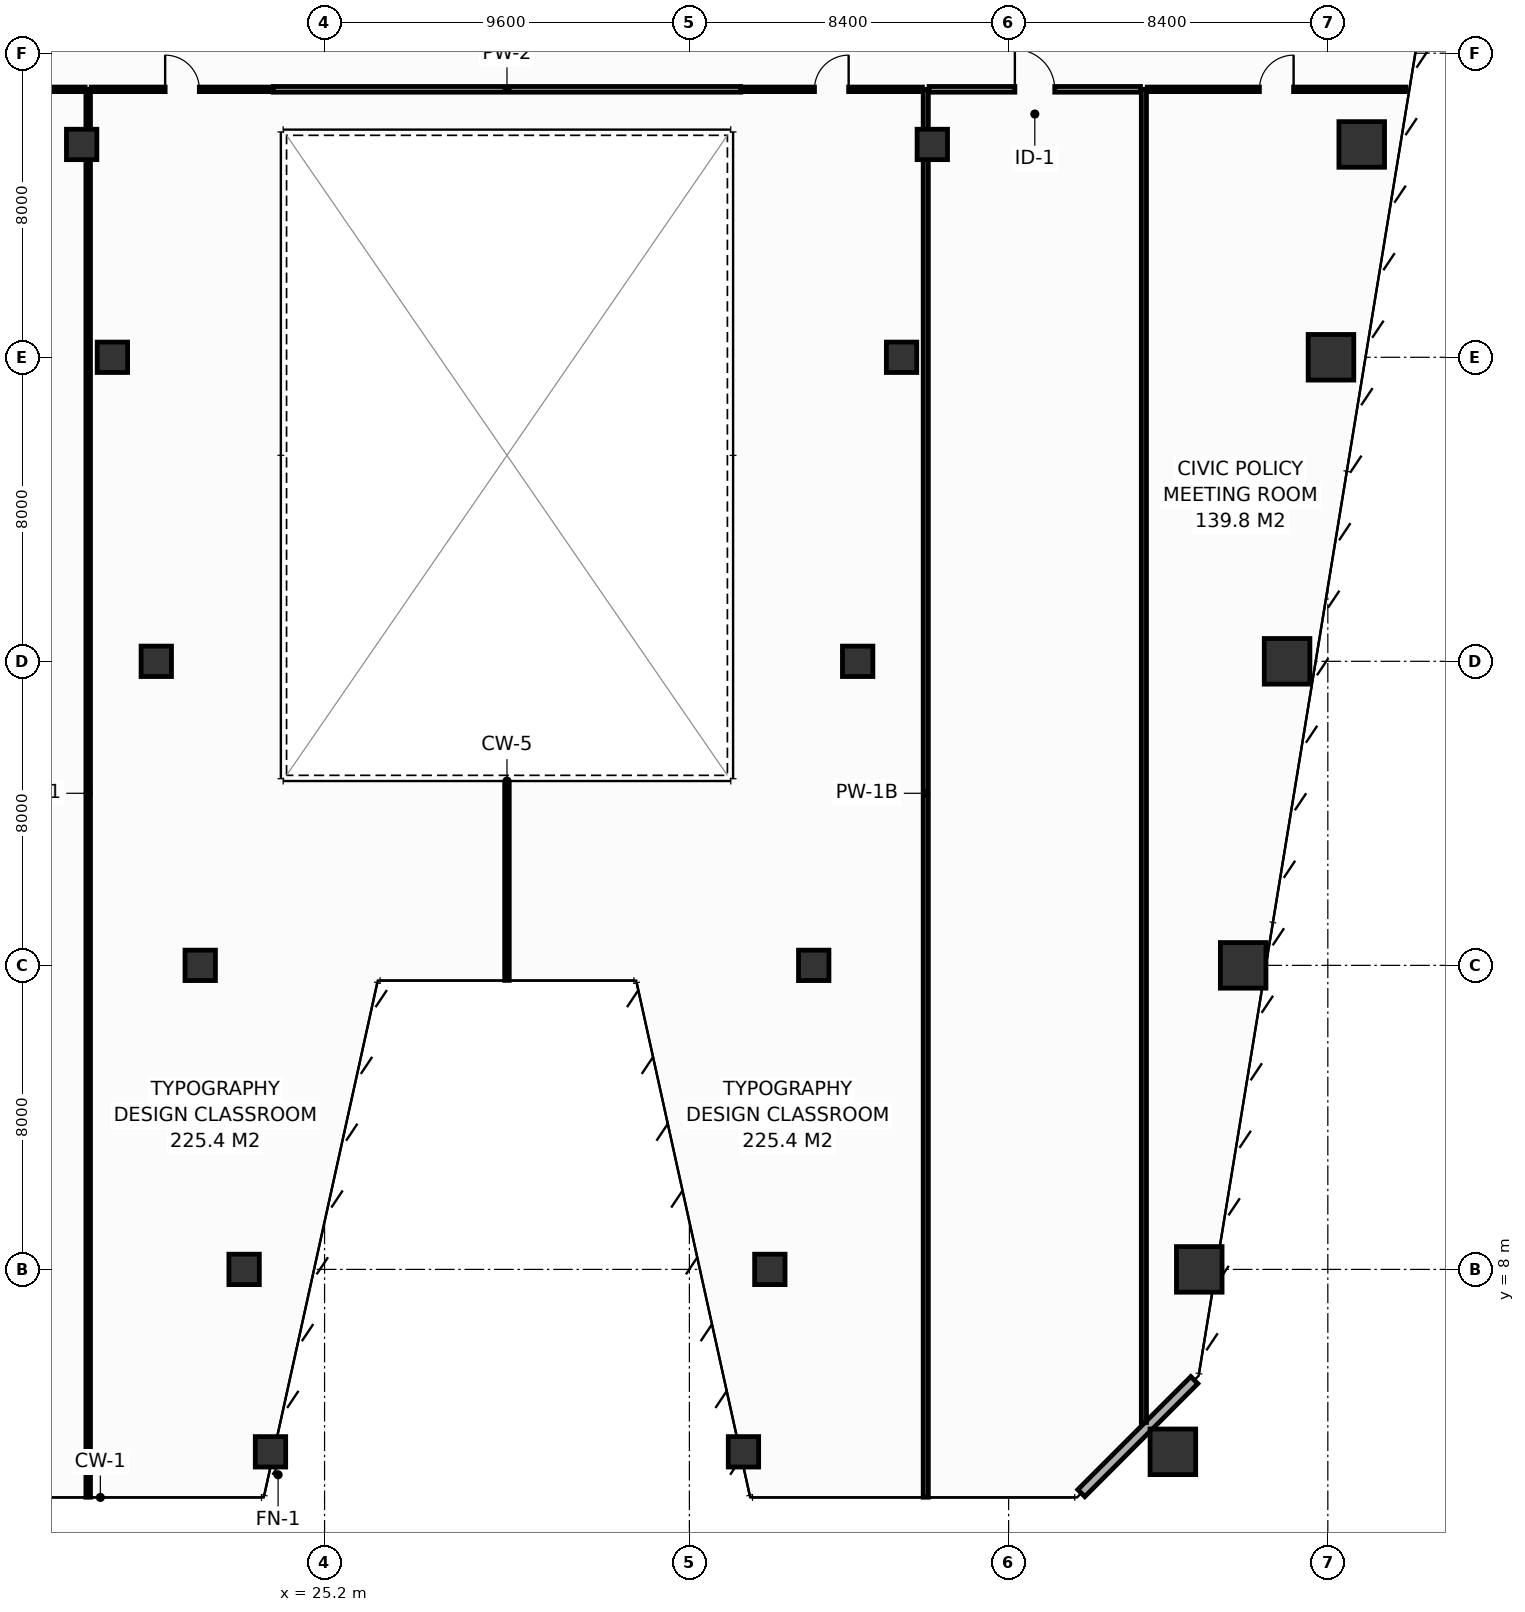
"""IFC4 building model, lengths in metres.
Left out: names, types, materials, properties, quantities, classifications, styles, units other than length and angle.
Written with IfcOpenShell. Run it as: python <this file> out.ifc"""

import sys

from ifc_helpers import new_model, si_unit, direction, frame, frame_2d, origin, origin_2d, place, context, subcontext, project, spatial, rectangle, hollow_rectangle, extrude, element, fill, save


model = new_model("IFC4")
c1 = context("Model", 3, precision=1e-05, world=origin(), true_north=direction((0.0, 1.0)))
c2 = subcontext(c1, "Body", "Model", "MODEL_VIEW")
j1 = project(units=[si_unit("LENGTHUNIT", "METRE"), si_unit("PLANEANGLEUNIT", "RADIAN")], contexts=[c1])
p1 = place(None, origin())
s1 = spatial("IfcSite", under=j1, at=p1, CompositionType="ELEMENT")
p2 = place(p1, origin())
s2 = spatial("IfcBuilding", under=s1, at=p2, CompositionType="ELEMENT")
p3 = place(p2, frame((0.0, 0.0, 69.2)))
s3 = spatial("IfcBuildingStorey", under=s2, at=p3, CompositionType="ELEMENT", Elevation=69.2)
p4 = place(p3, frame((47.523, 3.2, 0.0), z_axis=(0.0, 0.0, 1.0), x_axis=(1.0, 0.0, 0.0)))
e1 = element("IfcColumn", 1, at=p4, inside=s3, PredefinedType="COLUMN", context=c2, shape_type="SweptSolid", body=[
    extrude(hollow_rectangle(XDim=1.2, YDim=1.2, WallThickness=0.055, at=origin_2d()), origin(), (0.0, 0.0, 1.0), 4.4),
])
for number, where, z_axis, x_axis in (
    (2, (23.777, 3.2, 0.0), (0.0, 0.0, 1.0), (1.0, 0.0, 0.0)),
    (3, (36.223, 3.2, 0.0), (0.0, 0.0, 1.0), (1.0, 0.0, 0.0)),
):
    element("IfcColumn", number, at=place(p3, frame(where, z_axis=z_axis, x_axis=x_axis)), inside=s3, PredefinedType="COLUMN", context=c2, shape_type="SweptSolid", body=[
        extrude(hollow_rectangle(XDim=0.8, YDim=0.8, WallThickness=0.036, at=origin_2d()), origin(), (0.0, 0.0, 1.0), 4.4),
    ])
p5 = place(p3, frame((48.217, 8.0, 0.0), z_axis=(0.0, 0.0, 1.0), x_axis=(1.0, 0.0, 0.0)))
e4 = element("IfcColumn", 4, at=p5, inside=s3, PredefinedType="COLUMN", context=c2, shape_type="SweptSolid", body=[
    extrude(hollow_rectangle(XDim=1.2, YDim=1.2, WallThickness=0.055, at=origin_2d()), origin(), (0.0, 0.0, 1.0), 4.4),
])
for number, where, z_axis, x_axis in (
    (5, (23.083, 8.0, 0.0), (0.0, 0.0, 1.0), (1.0, 0.0, 0.0)),
    (6, (36.917, 8.0, 0.0), (0.0, 0.0, 1.0), (1.0, 0.0, 0.0)),
):
    element("IfcColumn", number, at=place(p3, frame(where, z_axis=z_axis, x_axis=x_axis)), inside=s3, PredefinedType="COLUMN", context=c2, shape_type="SweptSolid", body=[
        extrude(hollow_rectangle(XDim=0.8, YDim=0.8, WallThickness=0.036, at=origin_2d()), origin(), (0.0, 0.0, 1.0), 4.4),
    ])
p6 = place(p3, frame((49.372, 16.0, 0.0), z_axis=(0.0, 0.0, 1.0), x_axis=(1.0, 0.0, 0.0)))
e7 = element("IfcColumn", 7, at=p6, inside=s3, PredefinedType="COLUMN", context=c2, shape_type="SweptSolid", body=[
    extrude(hollow_rectangle(XDim=1.2, YDim=1.2, WallThickness=0.055, at=origin_2d()), origin(), (0.0, 0.0, 1.0), 4.4),
])
for number, where, z_axis, x_axis in (
    (8, (21.928, 16.0, 0.0), (0.0, 0.0, 1.0), (1.0, 0.0, 0.0)),
    (9, (38.072, 16.0, 0.0), (0.0, 0.0, 1.0), (1.0, 0.0, 0.0)),
):
    element("IfcColumn", number, at=place(p3, frame(where, z_axis=z_axis, x_axis=x_axis)), inside=s3, PredefinedType="COLUMN", context=c2, shape_type="SweptSolid", body=[
        extrude(hollow_rectangle(XDim=0.8, YDim=0.8, WallThickness=0.036, at=origin_2d()), origin(), (0.0, 0.0, 1.0), 4.4),
    ])
p7 = place(p3, frame((50.528, 24.0, 0.0), z_axis=(0.0, 0.0, 1.0), x_axis=(1.0, 0.0, 0.0)))
e10 = element("IfcColumn", 10, at=p7, inside=s3, PredefinedType="COLUMN", context=c2, shape_type="SweptSolid", body=[
    extrude(hollow_rectangle(XDim=1.2, YDim=1.2, WallThickness=0.055, at=origin_2d()), origin(), (0.0, 0.0, 1.0), 4.4),
])
for number, where, z_axis, x_axis in (
    (11, (20.772, 24.0, 0.0), (0.0, 0.0, 1.0), (1.0, 0.0, 0.0)),
    (12, (39.228, 24.0, 0.0), (0.0, 0.0, 1.0), (1.0, 0.0, 0.0)),
):
    element("IfcColumn", number, at=place(p3, frame(where, z_axis=z_axis, x_axis=x_axis)), inside=s3, PredefinedType="COLUMN", context=c2, shape_type="SweptSolid", body=[
        extrude(hollow_rectangle(XDim=0.8, YDim=0.8, WallThickness=0.036, at=origin_2d()), origin(), (0.0, 0.0, 1.0), 4.4),
    ])
p8 = place(p3, frame((51.683, 32.0, 0.0), z_axis=(0.0, 0.0, 1.0), x_axis=(1.0, 0.0, 0.0)))
e13 = element("IfcColumn", 13, at=p8, inside=s3, PredefinedType="COLUMN", context=c2, shape_type="SweptSolid", body=[
    extrude(hollow_rectangle(XDim=1.2, YDim=1.2, WallThickness=0.055, at=origin_2d()), origin(), (0.0, 0.0, 1.0), 4.4),
])
for number, where, z_axis, x_axis in (
    (14, (19.617, 32.0, 0.0), (0.0, 0.0, 1.0), (1.0, 0.0, 0.0)),
    (15, (40.383, 32.0, 0.0), (0.0, 0.0, 1.0), (1.0, 0.0, 0.0)),
):
    element("IfcColumn", number, at=place(p3, frame(where, z_axis=z_axis, x_axis=x_axis)), inside=s3, PredefinedType="COLUMN", context=c2, shape_type="SweptSolid", body=[
        extrude(hollow_rectangle(XDim=0.8, YDim=0.8, WallThickness=0.036, at=origin_2d()), origin(), (0.0, 0.0, 1.0), 4.4),
    ])
p9 = place(p3, frame((52.492, 37.6, 0.0), z_axis=(0.0, 0.0, 1.0), x_axis=(1.0, 0.0, 0.0)))
e16 = element("IfcColumn", 16, at=p9, inside=s3, PredefinedType="COLUMN", context=c2, shape_type="SweptSolid", body=[
    extrude(hollow_rectangle(XDim=1.2, YDim=1.2, WallThickness=0.055, at=origin_2d()), origin(), (0.0, 0.0, 1.0), 4.4),
])
for number, where, z_axis, x_axis in (
    (17, (18.808, 37.6, 0.0), (0.0, 0.0, 1.0), (1.0, 0.0, 0.0)),
    (18, (41.192, 37.6, 0.0), (0.0, 0.0, 1.0), (1.0, 0.0, 0.0)),
):
    element("IfcColumn", number, at=place(p3, frame(where, z_axis=z_axis, x_axis=x_axis)), inside=s3, PredefinedType="COLUMN", context=c2, shape_type="SweptSolid", body=[
        extrude(hollow_rectangle(XDim=0.8, YDim=0.8, WallThickness=0.036, at=origin_2d()), origin(), (0.0, 0.0, 1.0), 4.4),
    ])
p10 = place(p3, frame((45.113, 2.113, 0.0), z_axis=(0.0, 0.0, 1.0), x_axis=(0.707106781187, 0.707106781187, 0.0)))
e19 = element("IfcWall", 19, at=p10, inside=s3, PredefinedType="STANDARD", context=c2, shape_type="SweptSolid", body=[
    extrude(rectangle(XDim=4.206, YDim=0.26, at=frame_2d((2.103, 0.0))), origin(), (0.0, 0.0, 1.0), 4.15),
])
p11 = place(p3, frame((18.98, 2.005, 0.0), z_axis=(0.0, 0.0, 1.0), x_axis=(0.0, 1.0, 0.0)))
e20 = element("IfcWall", 20, at=p11, inside=s3, PredefinedType="PARTITIONING", context=c2, shape_type="SweptSolid", body=[
    extrude(rectangle(XDim=37.045, YDim=0.12, at=frame_2d((18.522, 0.0))), origin(), (0.0, 0.0, 1.0), 3.335),
])
p12 = place(p3, frame((41.02, 2.005, 0.0), z_axis=(0.0, 0.0, 1.0), x_axis=(0.0, 1.0, 0.0)))
e21 = element("IfcWall", 21, at=p12, inside=s3, PredefinedType="PARTITIONING", context=c2, shape_type="SweptSolid", body=[
    extrude(rectangle(XDim=37.045, YDim=0.135, at=frame_2d((18.522, 0.0))), origin(), (0.0, 0.0, 1.0), 3.335),
])
p13 = place(p3, frame((46.76, 3.972, 0.0), z_axis=(0.0, 0.0, 1.0), x_axis=(0.0, 1.0, 0.0)))
e22 = element("IfcWall", 22, at=p13, inside=s3, PredefinedType="PARTITIONING", context=c2, shape_type="SweptSolid", body=[
    extrude(rectangle(XDim=35.078, YDim=0.135, at=frame_2d((17.539, 0.0))), origin(), (0.0, 0.0, 1.0), 3.335),
])
p14 = place(p3, frame((30.0, 15.605, 0.0), z_axis=(0.0, 0.0, 1.0), x_axis=(0.0, 1.0, 0.0)))
e23 = element("IfcWall", 23, at=p14, inside=s3, PredefinedType="PARTITIONING", context=c2, shape_type="SweptSolid", body=[
    extrude(rectangle(XDim=5.175, YDim=0.12, at=frame_2d((2.587, 0.0))), origin(), (0.0, 0.0, 1.0), 4.15),
])
p15 = place(p3, frame((13.32, 39.05, 0.0), z_axis=(0.0, 0.0, 1.0), x_axis=(1.0, 0.0, 0.0)))
e24 = element("IfcWall", 24, at=p15, inside=s3, PredefinedType="PARTITIONING", context=c2, shape_type="SweptSolid", body=[
    extrude(rectangle(XDim=5.58, YDim=0.12, at=frame_2d((2.79, 0.0))), origin(), (0.0, 0.0, 1.0), 4.15),
])
p16 = place(p15, frame((2.34, 0.0, 0.0)))
e25 = element("IfcOpeningElement", 25, at=p16, cuts=e24, PredefinedType="OPENING", context=c2, shape_type="SweptSolid", body=[
    extrude(rectangle(XDim=0.9, YDim=2.1, at=frame_2d((0.45, 1.05))), frame((0.0, 0.07, 0.0), z_axis=(0.0, -1.0, 0.0), x_axis=(1.0, 0.0, 0.0)), (0.0, 0.0, 1.0), 0.14),
])
p17 = place(p3, frame((19.06, 39.05, 0.0), z_axis=(0.0, 0.0, 1.0), x_axis=(1.0, 0.0, 0.0)))
e26 = element("IfcWall", 26, at=p17, inside=s3, PredefinedType="PARTITIONING", context=c2, shape_type="SweptSolid", body=[
    extrude(rectangle(XDim=4.79, YDim=0.12, at=frame_2d((2.395, 0.0))), origin(), (0.0, 0.0, 1.0), 3.335),
])
p18 = place(p17, frame((1.945, 0.0, 0.0)))
e27 = element("IfcOpeningElement", 27, at=p18, cuts=e26, PredefinedType="OPENING", context=c2, shape_type="SweptSolid", body=[
    extrude(rectangle(XDim=0.9, YDim=2.1, at=frame_2d((0.45, 1.05))), frame((0.0, 0.07, 0.0), z_axis=(0.0, -1.0, 0.0), x_axis=(1.0, 0.0, 0.0)), (0.0, 0.0, 1.0), 0.14),
])
p19 = place(p3, frame((23.85, 39.05, 0.0), z_axis=(0.0, 0.0, 1.0), x_axis=(1.0, 0.0, 0.0)))
e28 = element("IfcWall", 28, at=p19, inside=s3, PredefinedType="PARTITIONING", context=c2, shape_type="SweptSolid", body=[
    extrude(rectangle(XDim=12.3, YDim=0.15, at=frame_2d((6.15, 0.0))), origin(), (0.0, 0.0, 1.0), 4.15),
])
p20 = place(p3, frame((36.15, 39.05, 0.0), z_axis=(0.0, 0.0, 1.0), x_axis=(1.0, 0.0, 0.0)))
e29 = element("IfcWall", 29, at=p20, inside=s3, PredefinedType="PARTITIONING", context=c2, shape_type="SweptSolid", body=[
    extrude(rectangle(XDim=4.783, YDim=0.12, at=frame_2d((2.391, 0.0))), origin(), (0.0, 0.0, 1.0), 3.335),
])
p21 = place(p20, frame((1.941, 0.0, 0.0)))
e30 = element("IfcOpeningElement", 30, at=p21, cuts=e29, PredefinedType="OPENING", context=c2, shape_type="SweptSolid", body=[
    extrude(rectangle(XDim=0.9, YDim=2.1, at=frame_2d((0.45, 1.05))), frame((0.0, 0.07, 0.0), z_axis=(0.0, -1.0, 0.0), x_axis=(1.0, 0.0, 0.0)), (0.0, 0.0, 1.0), 0.14),
])
p22 = place(p3, frame((41.107, 39.05, 0.0), z_axis=(0.0, 0.0, 1.0), x_axis=(1.0, 0.0, 0.0)))
e31 = element("IfcWall", 31, at=p22, inside=s3, PredefinedType="PARTITIONING", context=c2, shape_type="SweptSolid", body=[
    extrude(rectangle(XDim=5.565, YDim=0.15, at=frame_2d((2.783, 0.0))), origin(), (0.0, 0.0, 1.0), 4.15),
])
p23 = place(p22, frame((2.257, 0.0, 0.0)))
e32 = element("IfcOpeningElement", 32, at=p23, cuts=e31, PredefinedType="OPENING", context=c2, shape_type="SweptSolid", body=[
    extrude(rectangle(XDim=1.05, YDim=2.15, at=frame_2d((0.525, 1.075))), frame((0.0, 0.085, 0.0), z_axis=(0.0, -1.0, 0.0), x_axis=(1.0, 0.0, 0.0)), (0.0, 0.0, 1.0), 0.17),
])
p24 = place(p3, frame((46.847, 39.05, 0.0), z_axis=(0.0, 0.0, 1.0), x_axis=(1.0, 0.0, 0.0)))
e33 = element("IfcWall", 33, at=p24, inside=s3, PredefinedType="PARTITIONING", context=c2, shape_type="SweptSolid", body=[
    extrude(rectangle(XDim=6.804, YDim=0.12, at=frame_2d((3.402, 0.0))), origin(), (0.0, 0.0, 1.0), 3.635),
])
p25 = place(p24, frame((2.952, 0.0, 0.0)))
e34 = element("IfcOpeningElement", 34, at=p25, cuts=e33, PredefinedType="OPENING", context=c2, shape_type="SweptSolid", body=[
    extrude(rectangle(XDim=0.9, YDim=2.1, at=frame_2d((0.45, 1.05))), frame((0.0, 0.07, 0.0), z_axis=(0.0, -1.0, 0.0), x_axis=(1.0, 0.0, 0.0)), (0.0, 0.0, 1.0), 0.14),
])
p26 = place(p18, origin())
e35 = element("IfcDoor", 35, at=p26, inside=s3, OperationType="SINGLE_SWING_LEFT", PredefinedType="DOOR", context=c2, shape_type="SweptSolid", body=[
    extrude(rectangle(XDim=0.9, YDim=2.1, at=frame_2d((0.45, 1.05))), frame((0.0, 0.025, 0.0), z_axis=(0.0, -1.0, 0.0), x_axis=(1.0, 0.0, 0.0)), (0.0, 0.0, 1.0), 0.05),
])
fill(e27, e35)
p27 = place(p21, origin())
e36 = element("IfcDoor", 36, at=p27, inside=s3, OperationType="SINGLE_SWING_RIGHT", PredefinedType="DOOR", context=c2, shape_type="SweptSolid", body=[
    extrude(rectangle(XDim=0.9, YDim=2.1, at=frame_2d((0.45, 1.05))), frame((0.0, 0.025, 0.0), z_axis=(0.0, -1.0, 0.0), x_axis=(1.0, 0.0, 0.0)), (0.0, 0.0, 1.0), 0.05),
])
fill(e30, e36)
p28 = place(p23, origin())
e37 = element("IfcDoor", 37, at=p28, inside=s3, OperationType="SINGLE_SWING_LEFT", PredefinedType="DOOR", context=c2, shape_type="SweptSolid", body=[
    extrude(rectangle(XDim=1.05, YDim=2.15, at=frame_2d((0.525, 1.075))), frame((0.0, 0.025, 0.0), z_axis=(0.0, -1.0, 0.0), x_axis=(1.0, 0.0, 0.0)), (0.0, 0.0, 1.0), 0.05),
])
fill(e32, e37)
p29 = place(p25, origin())
e38 = element("IfcDoor", 38, at=p29, inside=s3, OperationType="SINGLE_SWING_RIGHT", PredefinedType="DOOR", context=c2, shape_type="SweptSolid", body=[
    extrude(rectangle(XDim=0.9, YDim=2.1, at=frame_2d((0.45, 1.05))), frame((0.0, 0.025, 0.0), z_axis=(0.0, -1.0, 0.0), x_axis=(1.0, 0.0, 0.0)), (0.0, 0.0, 1.0), 0.05),
])
fill(e34, e38)
save(model, sys.argv[1])
